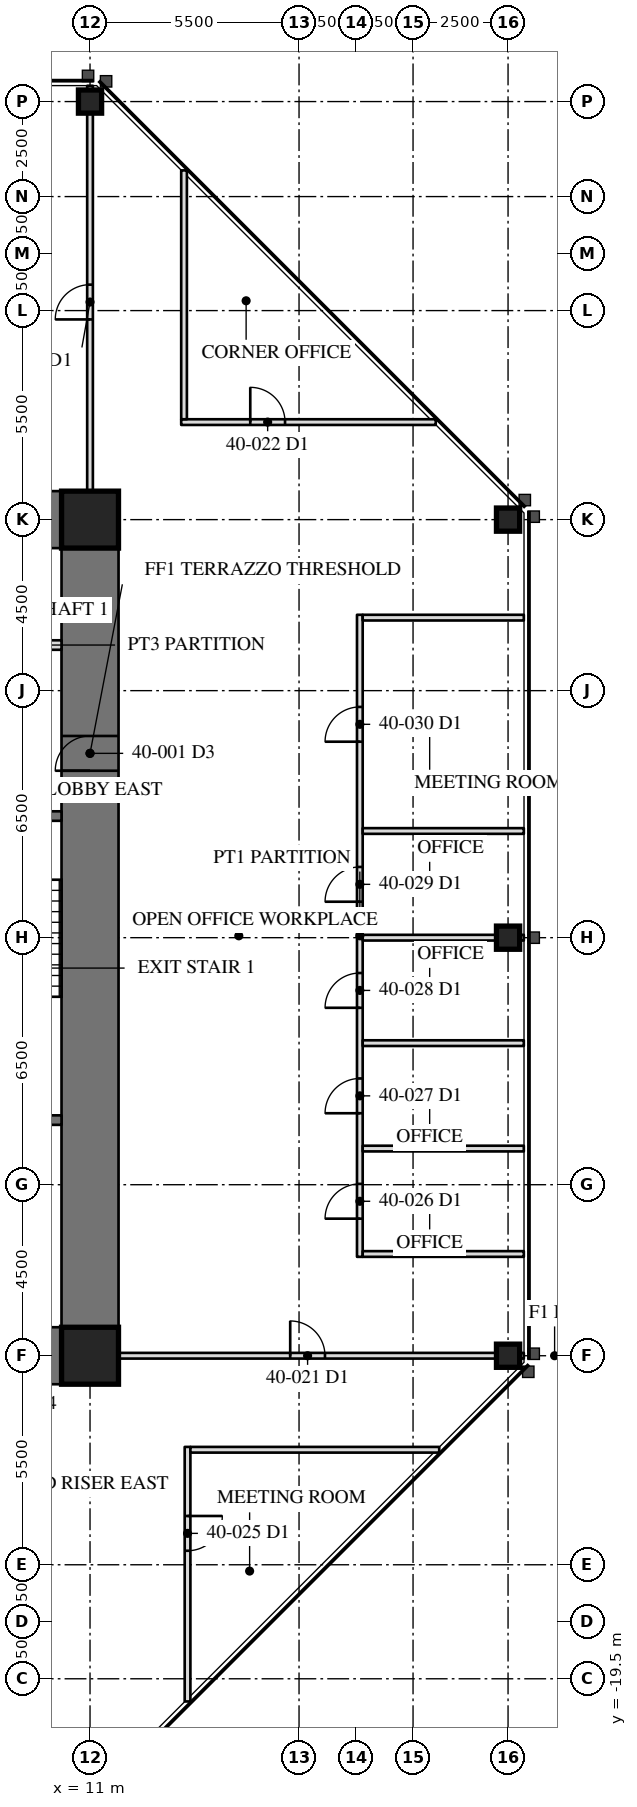
"""IFC4 building model, lengths in metres.
Left out: names, types, materials, properties, quantities, classifications, styles, units other than length and angle.
Written with IfcOpenShell. Run it as: python <this file> out.ifc"""

import sys

from ifc_helpers import new_model, si_unit, direction, frame, frame_2d, origin, origin_2d, place, context, subcontext, project, spatial, rectangle, hollow_rectangle, extrude, element, fill, save


model = new_model("IFC4")
c1 = context("Model", 3, precision=1e-05, world=origin(), true_north=direction((0.0, 1.0)))
c2 = subcontext(c1, "Body", "Model", "MODEL_VIEW")
j1 = project(units=[si_unit("LENGTHUNIT", "METRE"), si_unit("PLANEANGLEUNIT", "RADIAN")], contexts=[c1])
p1 = place(None, origin())
s1 = spatial("IfcSite", under=j1, at=p1, CompositionType="ELEMENT")
p2 = place(p1, origin())
s2 = spatial("IfcBuilding", under=s1, at=p2, CompositionType="ELEMENT")
p3 = place(p2, frame((0.0, 0.0, 170.5)))
s3 = spatial("IfcBuildingStorey", under=s2, at=p3, CompositionType="ELEMENT", Elevation=170.5)
for number, where, z_axis, x_axis in (
    (1, (22.0, -11.0, 0.0), (0.0, 0.0, 1.0), (0.0, 1.0, 0.0)),
    (2, (22.0, 0.0, 0.0), (0.0, 0.0, 1.0), (0.0, 1.0, 0.0)),
    (3, (22.0, 11.0, 0.0), (0.0, 0.0, 1.0), (0.0, 1.0, 0.0)),
    (4, (11.0, 22.0, 0.0), (0.0, 0.0, 1.0), (1.0, 0.0, 0.0)),
):
    element("IfcColumn", number, at=place(p3, frame(where, z_axis=z_axis, x_axis=x_axis)), inside=s3, PredefinedType="COLUMN", context=c2, shape_type="SweptSolid", body=[
        extrude(hollow_rectangle(XDim=0.61, YDim=0.61, WallThickness=0.076, at=origin_2d()), origin(), (0.0, 0.0, 1.0), 4.1),
    ])
p4 = place(p3, frame((11.0, -11.0, 0.0), z_axis=(0.0, 0.0, 1.0), x_axis=(0.0, 1.0, 0.0)))
e5 = element("IfcWall", 5, at=p4, inside=s3, PredefinedType="SHEAR", context=c2, shape_type="SweptSolid", body=[
    extrude(rectangle(XDim=22.0, YDim=1.5, at=frame_2d((11.0, 0.0))), origin(), (0.0, 0.0, 1.0), 4.1),
])
p5 = place(p4, frame((15.393, 0.0, 0.0)))
e6 = element("IfcOpeningElement", 6, at=p5, cuts=e5, PredefinedType="OPENING", context=c2, shape_type="SweptSolid", body=[
    extrude(rectangle(XDim=0.915, YDim=2.134, at=frame_2d((0.458, 1.067))), frame((0.0, 0.76, 0.0), z_axis=(0.0, -1.0, 0.0), x_axis=(1.0, 0.0, 0.0)), (0.0, 0.0, 1.0), 1.52),
])
for number, where, z_axis, x_axis in (
    (7, (11.0, 11.0, 0.0), (0.0, 0.0, 1.0), (-1.0, 0.0, 0.0)),
    (8, (6.5, -11.0, 0.0), (0.0, 0.0, 1.0), (1.0, 0.0, 0.0)),
):
    element("IfcWall", number, at=place(p3, frame(where, z_axis=z_axis, x_axis=x_axis)), inside=s3, PredefinedType="SHEAR", context=c2, shape_type="SweptSolid", body=[
        extrude(rectangle(XDim=4.5, YDim=1.5, at=frame_2d((2.25, 0.0))), origin(), (0.0, 0.0, 1.0), 4.1),
    ])
for number, where, z_axis, x_axis in (
    (9, (11.0, 11.0, 0.0), (0.0, 0.0, 1.0), (1.0, 0.0, 0.0)),
    (10, (11.0, -11.0, 0.0), (0.0, 0.0, 1.0), (1.0, 0.0, 0.0)),
):
    element("IfcColumn", number, at=place(p3, frame(where, z_axis=z_axis, x_axis=x_axis)), inside=s3, PredefinedType="COLUMN", context=c2, shape_type="SweptSolid", body=[
        extrude(hollow_rectangle(XDim=1.499, YDim=1.499, WallThickness=0.102, at=origin_2d()), origin(), (0.0, 0.0, 1.0), 4.1),
    ])
p6 = place(p3, frame((6.95, -4.8, 0.0), z_axis=(0.0, 0.0, 1.0), x_axis=(1.0, 0.0, 0.0)))
e11 = element("IfcWall", 11, at=p6, inside=s3, PredefinedType="SOLIDWALL", context=c2, shape_type="SweptSolid", body=[
    extrude(rectangle(XDim=3.3, YDim=0.25, at=frame_2d((1.65, 0.0))), origin(), (0.0, 0.0, 1.0), 3.91),
])
p7 = place(p3, frame((6.95, 3.2, 0.0), z_axis=(0.0, 0.0, 1.0), x_axis=(1.0, 0.0, 0.0)))
e12 = element("IfcWall", 12, at=p7, inside=s3, PredefinedType="SOLIDWALL", context=c2, shape_type="SweptSolid", body=[
    extrude(rectangle(XDim=3.3, YDim=0.25, at=frame_2d((1.65, 0.0))), origin(), (0.0, 0.0, 1.0), 3.91),
])
p8 = place(p7, frame((1.116, 0.0, 0.0)))
e13 = element("IfcOpeningElement", 13, at=p8, cuts=e12, PredefinedType="OPENING", context=c2, shape_type="SweptSolid", body=[
    extrude(rectangle(XDim=1.067, YDim=2.134, at=frame_2d((0.533, 1.067))), frame((0.0, 0.135, 0.0), z_axis=(0.0, -1.0, 0.0), x_axis=(1.0, 0.0, 0.0)), (0.0, 0.0, 1.0), 0.27),
])
p9 = place(p3, frame((6.95, 7.7, 0.0), z_axis=(0.0, 0.0, 1.0), x_axis=(1.0, 0.0, 0.0)))
e14 = element("IfcWall", 14, at=p9, inside=s3, PredefinedType="PARTITIONING", context=c2, shape_type="SweptSolid", body=[
    extrude(rectangle(XDim=3.3, YDim=0.25, at=frame_2d((1.65, 0.0))), origin(), (0.0, 0.0, 1.0), 3.91),
])
p10 = place(p9, frame((0.45, 0.0, 0.0)))
e15 = element("IfcOpeningElement", 15, at=p10, cuts=e14, PredefinedType="OPENING", context=c2, shape_type="SweptSolid", body=[
    extrude(rectangle(XDim=1.219, YDim=2.134, at=frame_2d((0.609, 1.067))), frame((0.0, 0.135, 0.0), z_axis=(0.0, -1.0, 0.0), x_axis=(1.0, 0.0, 0.0)), (0.0, 0.0, 1.0), 0.27),
])
p11 = place(p3, frame((11.0, 11.75, 0.0), z_axis=(0.0, 0.0, 1.0), x_axis=(0.0, 1.0, 0.0)))
e16 = element("IfcWall", 16, at=p11, inside=s3, PredefinedType="PARTITIONING", context=c2, shape_type="SweptSolid", body=[
    extrude(rectangle(XDim=10.665, YDim=0.15, at=frame_2d((5.333, 0.0))), origin(), (0.0, 0.0, 1.0), 3.326),
])
p12 = place(p11, frame((4.518, 0.0, 0.0)))
e17 = element("IfcOpeningElement", 17, at=p12, cuts=e16, PredefinedType="OPENING", context=c2, shape_type="SweptSolid", body=[
    extrude(rectangle(XDim=0.915, YDim=2.134, at=frame_2d((0.458, 1.067))), frame((0.0, 0.085, 0.0), z_axis=(0.0, -1.0, 0.0), x_axis=(1.0, 0.0, 0.0)), (0.0, 0.0, 1.0), 0.17),
])
p13 = place(p3, frame((11.75, -11.0, 0.0), z_axis=(0.0, 0.0, 1.0), x_axis=(1.0, 0.0, 0.0)))
e18 = element("IfcWall", 18, at=p13, inside=s3, PredefinedType="PARTITIONING", context=c2, shape_type="SweptSolid", body=[
    extrude(rectangle(XDim=10.665, YDim=0.15, at=frame_2d((5.333, 0.0))), origin(), (0.0, 0.0, 1.0), 3.326),
])
p14 = place(p13, frame((4.518, 0.0, 0.0)))
e19 = element("IfcOpeningElement", 19, at=p14, cuts=e18, PredefinedType="OPENING", context=c2, shape_type="SweptSolid", body=[
    extrude(rectangle(XDim=0.915, YDim=2.134, at=frame_2d((0.458, 1.067))), frame((0.0, 0.085, 0.0), z_axis=(0.0, -1.0, 0.0), x_axis=(1.0, 0.0, 0.0)), (0.0, 0.0, 1.0), 0.17),
])
p15 = place(p3, frame((13.399, 13.566, 0.0), z_axis=(0.0, 0.0, 1.0), x_axis=(1.0, 0.0, 0.0)))
e20 = element("IfcWall", 20, at=p15, inside=s3, PredefinedType="PARTITIONING", context=c2, shape_type="SweptSolid", body=[
    extrude(rectangle(XDim=6.698, YDim=0.15, at=frame_2d((3.349, 0.0))), origin(), (0.0, 0.0, 1.0), 3.91),
])
p16 = place(p15, frame((1.817, 0.0, 0.0)))
e21 = element("IfcOpeningElement", 21, at=p16, cuts=e20, PredefinedType="OPENING", context=c2, shape_type="SweptSolid", body=[
    extrude(rectangle(XDim=0.915, YDim=2.134, at=frame_2d((0.458, 1.067))), frame((0.0, 0.085, 0.0), z_axis=(0.0, -1.0, 0.0), x_axis=(1.0, 0.0, 0.0)), (0.0, 0.0, 1.0), 0.17),
])
p17 = place(p3, frame((13.474, 13.641, 0.0), z_axis=(0.0, 0.0, 1.0), x_axis=(0.0, 1.0, 0.0)))
e22 = element("IfcWall", 22, at=p17, inside=s3, PredefinedType="PARTITIONING", context=c2, shape_type="SweptSolid", body=[
    extrude(rectangle(XDim=6.548, YDim=0.15, at=frame_2d((3.274, 0.0))), origin(), (0.0, 0.0, 1.0), 3.91),
])
p18 = place(p3, frame((13.566, -13.399, 0.0), z_axis=(0.0, 0.0, 1.0), x_axis=(0.0, -1.0, 0.0)))
e23 = element("IfcWall", 23, at=p18, inside=s3, PredefinedType="PARTITIONING", context=c2, shape_type="SweptSolid", body=[
    extrude(rectangle(XDim=6.698, YDim=0.15, at=frame_2d((3.349, 0.0))), origin(), (0.0, 0.0, 1.0), 3.91),
])
p19 = place(p18, frame((1.817, 0.0, 0.0)))
e24 = element("IfcOpeningElement", 24, at=p19, cuts=e23, PredefinedType="OPENING", context=c2, shape_type="SweptSolid", body=[
    extrude(rectangle(XDim=0.915, YDim=2.134, at=frame_2d((0.458, 1.067))), frame((0.0, 0.085, 0.0), z_axis=(0.0, -1.0, 0.0), x_axis=(1.0, 0.0, 0.0)), (0.0, 0.0, 1.0), 0.17),
])
p20 = place(p3, frame((13.641, -13.474, 0.0), z_axis=(0.0, 0.0, 1.0), x_axis=(1.0, 0.0, 0.0)))
e25 = element("IfcWall", 25, at=p20, inside=s3, PredefinedType="PARTITIONING", context=c2, shape_type="SweptSolid", body=[
    extrude(rectangle(XDim=6.548, YDim=0.15, at=frame_2d((3.274, 0.0))), origin(), (0.0, 0.0, 1.0), 3.91),
])
p21 = place(p3, frame((18.1, -8.398, 0.0), z_axis=(0.0, 0.0, 1.0), x_axis=(0.0, 1.0, 0.0)))
e26 = element("IfcWall", 26, at=p21, inside=s3, PredefinedType="PARTITIONING", context=c2, shape_type="SweptSolid", body=[
    extrude(rectangle(XDim=16.894, YDim=0.15, at=frame_2d((8.447, 0.0))), origin(), (0.0, 0.0, 1.0), 3.91),
])
p22 = place(p21, frame((1.004, 0.0, 0.0)))
e27 = element("IfcOpeningElement", 27, at=p22, cuts=e26, PredefinedType="OPENING", context=c2, shape_type="SweptSolid", body=[
    extrude(rectangle(XDim=0.915, YDim=2.134, at=frame_2d((0.458, 1.067))), frame((0.0, 0.085, 0.0), z_axis=(0.0, -1.0, 0.0), x_axis=(1.0, 0.0, 0.0)), (0.0, 0.0, 1.0), 0.17),
])
p23 = place(p21, frame((3.779, 0.0, 0.0)))
e28 = element("IfcOpeningElement", 28, at=p23, cuts=e26, PredefinedType="OPENING", context=c2, shape_type="SweptSolid", body=[
    extrude(rectangle(XDim=0.915, YDim=2.134, at=frame_2d((0.458, 1.067))), frame((0.0, 0.085, 0.0), z_axis=(0.0, -1.0, 0.0), x_axis=(1.0, 0.0, 0.0)), (0.0, 0.0, 1.0), 0.17),
])
p24 = place(p21, frame((6.553, 0.0, 0.0)))
e29 = element("IfcOpeningElement", 29, at=p24, cuts=e26, PredefinedType="OPENING", context=c2, shape_type="SweptSolid", body=[
    extrude(rectangle(XDim=0.915, YDim=2.134, at=frame_2d((0.458, 1.067))), frame((0.0, 0.085, 0.0), z_axis=(0.0, -1.0, 0.0), x_axis=(1.0, 0.0, 0.0)), (0.0, 0.0, 1.0), 0.17),
])
p25 = place(p21, frame((9.344, 0.0, 0.0)))
e30 = element("IfcOpeningElement", 30, at=p25, cuts=e26, PredefinedType="OPENING", context=c2, shape_type="SweptSolid", body=[
    extrude(rectangle(XDim=0.915, YDim=2.134, at=frame_2d((0.458, 1.067))), frame((0.0, 0.085, 0.0), z_axis=(0.0, -1.0, 0.0), x_axis=(1.0, 0.0, 0.0)), (0.0, 0.0, 1.0), 0.17),
])
p26 = place(p21, frame((13.554, 0.0, 0.0)))
e31 = element("IfcOpeningElement", 31, at=p26, cuts=e26, PredefinedType="OPENING", context=c2, shape_type="SweptSolid", body=[
    extrude(rectangle(XDim=0.915, YDim=2.134, at=frame_2d((0.458, 1.067))), frame((0.0, 0.085, 0.0), z_axis=(0.0, -1.0, 0.0), x_axis=(1.0, 0.0, 0.0)), (0.0, 0.0, 1.0), 0.17),
])
for number, where, z_axis, x_axis in (
    (32, (18.175, -8.323, 0.0), (0.0, 0.0, 1.0), (1.0, 0.0, 0.0)),
    (33, (18.175, -5.549, 0.0), (0.0, 0.0, 1.0), (1.0, 0.0, 0.0)),
    (34, (18.175, -2.775, 0.0), (0.0, 0.0, 1.0), (1.0, 0.0, 0.0)),
):
    element("IfcWall", number, at=place(p3, frame(where, z_axis=z_axis, x_axis=x_axis)), inside=s3, PredefinedType="PARTITIONING", context=c2, shape_type="SweptSolid", body=[
        extrude(rectangle(XDim=4.24, YDim=0.15, at=frame_2d((2.12, 0.0))), origin(), (0.0, 0.0, 1.0), 3.91),
    ])
p27 = place(p3, frame((18.175, 0.0, 0.0), z_axis=(0.0, 0.0, 1.0), x_axis=(1.0, 0.0, 0.0)))
e35 = element("IfcWall", 35, at=p27, inside=s3, PredefinedType="PARTITIONING", context=c2, shape_type="SweptSolid", body=[
    extrude(rectangle(XDim=4.24, YDim=0.15, at=frame_2d((2.12, 0.0))), origin(), (0.0, 0.0, 1.0), 3.326),
])
for number, where, z_axis, x_axis in (
    (36, (18.175, 2.807, 0.0), (0.0, 0.0, 1.0), (1.0, 0.0, 0.0)),
    (37, (18.175, 8.421, 0.0), (0.0, 0.0, 1.0), (1.0, 0.0, 0.0)),
):
    element("IfcWall", number, at=place(p3, frame(where, z_axis=z_axis, x_axis=x_axis)), inside=s3, PredefinedType="PARTITIONING", context=c2, shape_type="SweptSolid", body=[
        extrude(rectangle(XDim=4.24, YDim=0.15, at=frame_2d((2.12, 0.0))), origin(), (0.0, 0.0, 1.0), 3.91),
    ])
p28 = place(p5, origin())
e38 = element("IfcDoor", 38, at=p28, inside=s3, OperationType="SINGLE_SWING_RIGHT", PredefinedType="DOOR", context=c2, shape_type="SweptSolid", body=[
    extrude(rectangle(XDim=0.915, YDim=2.134, at=frame_2d((0.458, 1.067))), frame((0.0, -0.675, 0.0), z_axis=(0.0, -1.0, 0.0), x_axis=(1.0, 0.0, 0.0)), (0.0, 0.0, 1.0), 0.05),
])
fill(e6, e38)
p29 = place(p12, origin())
e39 = element("IfcDoor", 39, at=p29, inside=s3, OperationType="SINGLE_SWING_LEFT", PredefinedType="DOOR", context=c2, shape_type="SweptSolid", body=[
    extrude(rectangle(XDim=0.915, YDim=2.134, at=frame_2d((0.458, 1.067))), frame((0.0, 0.025, 0.0), z_axis=(0.0, -1.0, 0.0), x_axis=(1.0, 0.0, 0.0)), (0.0, 0.0, 1.0), 0.05),
])
fill(e17, e39)
p30 = place(p14, origin())
e40 = element("IfcDoor", 40, at=p30, inside=s3, OperationType="SINGLE_SWING_LEFT", PredefinedType="DOOR", context=c2, shape_type="SweptSolid", body=[
    extrude(rectangle(XDim=0.915, YDim=2.134, at=frame_2d((0.458, 1.067))), frame((0.0, 0.025, 0.0), z_axis=(0.0, -1.0, 0.0), x_axis=(1.0, 0.0, 0.0)), (0.0, 0.0, 1.0), 0.05),
])
fill(e19, e40)
p31 = place(p16, origin())
e41 = element("IfcDoor", 41, at=p31, inside=s3, OperationType="SINGLE_SWING_LEFT", PredefinedType="DOOR", context=c2, shape_type="SweptSolid", body=[
    extrude(rectangle(XDim=0.915, YDim=2.134, at=frame_2d((0.458, 1.067))), frame((0.0, 0.025, 0.0), z_axis=(0.0, -1.0, 0.0), x_axis=(1.0, 0.0, 0.0)), (0.0, 0.0, 1.0), 0.05),
])
fill(e21, e41)
p32 = place(p19, origin())
e42 = element("IfcDoor", 42, at=p32, inside=s3, OperationType="SINGLE_SWING_LEFT", PredefinedType="DOOR", context=c2, shape_type="SweptSolid", body=[
    extrude(rectangle(XDim=0.915, YDim=2.134, at=frame_2d((0.458, 1.067))), frame((0.0, 0.025, 0.0), z_axis=(0.0, -1.0, 0.0), x_axis=(1.0, 0.0, 0.0)), (0.0, 0.0, 1.0), 0.05),
])
fill(e24, e42)
p33 = place(p22, origin())
e43 = element("IfcDoor", 43, at=p33, inside=s3, OperationType="SINGLE_SWING_LEFT", PredefinedType="DOOR", context=c2, shape_type="SweptSolid", body=[
    extrude(rectangle(XDim=0.915, YDim=2.134, at=frame_2d((0.458, 1.067))), frame((0.0, 0.025, 0.0), z_axis=(0.0, -1.0, 0.0), x_axis=(1.0, 0.0, 0.0)), (0.0, 0.0, 1.0), 0.05),
])
fill(e27, e43)
p34 = place(p23, origin())
e44 = element("IfcDoor", 44, at=p34, inside=s3, OperationType="SINGLE_SWING_LEFT", PredefinedType="DOOR", context=c2, shape_type="SweptSolid", body=[
    extrude(rectangle(XDim=0.915, YDim=2.134, at=frame_2d((0.458, 1.067))), frame((0.0, 0.025, 0.0), z_axis=(0.0, -1.0, 0.0), x_axis=(1.0, 0.0, 0.0)), (0.0, 0.0, 1.0), 0.05),
])
fill(e28, e44)
p35 = place(p24, origin())
e45 = element("IfcDoor", 45, at=p35, inside=s3, OperationType="SINGLE_SWING_LEFT", PredefinedType="DOOR", context=c2, shape_type="SweptSolid", body=[
    extrude(rectangle(XDim=0.915, YDim=2.134, at=frame_2d((0.458, 1.067))), frame((0.0, 0.025, 0.0), z_axis=(0.0, -1.0, 0.0), x_axis=(1.0, 0.0, 0.0)), (0.0, 0.0, 1.0), 0.05),
])
fill(e29, e45)
p36 = place(p25, origin())
e46 = element("IfcDoor", 46, at=p36, inside=s3, OperationType="SINGLE_SWING_LEFT", PredefinedType="DOOR", context=c2, shape_type="SweptSolid", body=[
    extrude(rectangle(XDim=0.915, YDim=2.134, at=frame_2d((0.458, 1.067))), frame((0.0, 0.025, 0.0), z_axis=(0.0, -1.0, 0.0), x_axis=(1.0, 0.0, 0.0)), (0.0, 0.0, 1.0), 0.05),
])
fill(e30, e46)
p37 = place(p26, origin())
e47 = element("IfcDoor", 47, at=p37, inside=s3, OperationType="SINGLE_SWING_LEFT", PredefinedType="DOOR", context=c2, shape_type="SweptSolid", body=[
    extrude(rectangle(XDim=0.915, YDim=2.134, at=frame_2d((0.458, 1.067))), frame((0.0, 0.025, 0.0), z_axis=(0.0, -1.0, 0.0), x_axis=(1.0, 0.0, 0.0)), (0.0, 0.0, 1.0), 0.05),
])
fill(e31, e47)
save(model, sys.argv[1])
